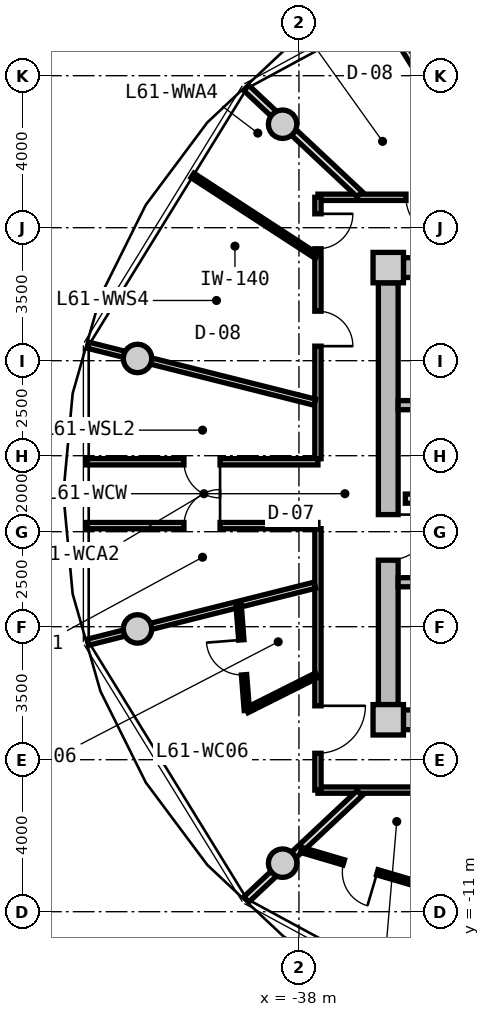
"""IFC4 building model, lengths in metres.
Left out: names, types, materials, properties, quantities, classifications, styles, units other than length and angle.
Written with IfcOpenShell. Run it as: python <this file> out.ifc"""

import sys

from ifc_helpers import new_model, si_unit, direction, frame, frame_2d, origin, origin_2d, place, context, subcontext, project, spatial, rectangle, circle, extrude, source, transform, mapped, element, fill, save


model = new_model("IFC4")
c1 = context("Model", 3, precision=1e-05, world=origin(), true_north=direction((0.0, 1.0)))
c2 = subcontext(c1, "Body", "Model", "MODEL_VIEW")
j1 = project(units=[si_unit("LENGTHUNIT", "METRE"), si_unit("PLANEANGLEUNIT", "RADIAN")], contexts=[c1])
p1 = place(None, origin())
s1 = spatial("IfcSite", under=j1, at=p1, CompositionType="ELEMENT")
p2 = place(p1, origin())
s2 = spatial("IfcBuilding", under=s1, at=p2, CompositionType="ELEMENT")
p3 = place(p2, frame((0.0, 0.0, 196.75)))
s3 = spatial("IfcBuildingStorey", under=s2, at=p3, CompositionType="ELEMENT", Elevation=196.75)
m1 = source(origin(), c2, "Body", "SweptSolid", [
    extrude(rectangle(XDim=0.8, YDim=0.8, at=origin_2d()), origin(), (0.0, 0.0, 1.0), 3.05),
])
for number, where, z_axis, x_axis in (
    (1, (-35.65, -5.95, 0.0), (0.0, 0.0, 1.0), (1.0, 0.0, 0.0)),
    (2, (-35.65, 5.95, 0.0), (0.0, 0.0, 1.0), (1.0, 0.0, 0.0)),
):
    element("IfcColumn", number, at=place(p3, frame(where, z_axis=z_axis, x_axis=x_axis)), inside=s3, PredefinedType="COLUMN", context=c2, shape_type="MappedRepresentation", body=[
        mapped(m1, transform((0.0, 0.0, 0.0), x_axis=(1.0, 0.0, 0.0), y_axis=(0.0, 1.0, 0.0), z_axis=(0.0, 0.0, 1.0), scale=1.0)),
    ])
m2 = source(origin(), c2, "Body", "SweptSolid", [
    extrude(rectangle(XDim=14.5, YDim=0.52, at=frame_2d((7.25, 0.0))), origin(), (0.0, 0.0, 1.0), 2.76),
])
for number, where, z_axis, x_axis in (
    (3, (-35.25, 5.95, 0.0), (0.0, 0.0, 1.0), (1.0, 0.0, 0.0)),
    (4, (-20.75, -5.95, 0.0), (0.0, 0.0, 1.0), (-1.0, 0.0, 0.0)),
):
    element("IfcWall", number, at=place(p3, frame(where, z_axis=z_axis, x_axis=x_axis)), inside=s3, PredefinedType="SHEAR", context=c2, shape_type="MappedRepresentation", body=[
        mapped(m2, transform((0.0, 0.0, 0.0), x_axis=(1.0, 0.0, 0.0), y_axis=(0.0, 1.0, 0.0), z_axis=(0.0, 0.0, 1.0), scale=1.0)),
    ])
m3 = source(origin(), c2, "Body", "SweptSolid", [
    extrude(rectangle(XDim=11.1, YDim=0.52, at=frame_2d((5.55, 0.0))), origin(), (0.0, 0.0, 1.0), 2.76),
])
p4 = place(p3, frame((-35.65, -5.55, 0.0), z_axis=(0.0, 0.0, 1.0), x_axis=(0.0, 1.0, 0.0)))
e5 = element("IfcWall", 5, at=p4, inside=s3, PredefinedType="SHEAR", context=c2, shape_type="MappedRepresentation", body=[
    mapped(m3, transform((0.0, 0.0, 0.0), x_axis=(1.0, 0.0, 0.0), y_axis=(0.0, 1.0, 0.0), z_axis=(0.0, 0.0, 1.0), scale=1.0)),
])
p5 = place(p4, frame((3.8, 0.0, 0.0)))
e6 = element("IfcOpeningElement", 6, at=p5, cuts=e5, PredefinedType="OPENING", context=c2, shape_type="SweptSolid", body=[
    extrude(rectangle(XDim=1.2, YDim=2.15, at=frame_2d((0.6, 1.075))), frame((0.0, 0.27, 0.0), z_axis=(0.0, -1.0, 0.0), x_axis=(1.0, 0.0, 0.0)), (0.0, 0.0, 1.0), 0.54),
])
m4 = source(origin(), c2, "Body", "SweptSolid", [
    extrude(circle(Radius=0.375, at=origin_2d()), origin(), (0.0, 0.0, 1.0), 3.05),
])
for number, where, z_axis, x_axis in (
    (7, (-38.43, 9.723, 0.0), (0.0, 0.0, 1.0), (1.0, 0.0, 0.0)),
    (8, (-42.247, 3.559, 0.0), (0.0, 0.0, 1.0), (1.0, 0.0, 0.0)),
    (9, (-42.247, -3.559, 0.0), (0.0, 0.0, 1.0), (1.0, 0.0, 0.0)),
    (10, (-38.43, -9.723, 0.0), (0.0, 0.0, 1.0), (1.0, 0.0, 0.0)),
):
    element("IfcColumn", number, at=place(p3, frame(where, z_axis=z_axis, x_axis=x_axis)), inside=s3, PredefinedType="COLUMN", context=c2, shape_type="MappedRepresentation", body=[
        mapped(m4, transform((0.0, 0.0, 0.0), x_axis=(1.0, 0.0, 0.0), y_axis=(0.0, 1.0, 0.0), z_axis=(0.0, 0.0, 1.0), scale=1.0)),
    ])
m5 = source(origin(), c2, "Body", "SweptSolid", [
    extrude(rectangle(XDim=7.93, YDim=0.24, at=frame_2d((3.965, 0.0))), origin(), (0.0, 0.0, 1.0), 2.76),
])
p6 = place(p3, frame((-35.39, 2.33, 0.0), z_axis=(0.0, 0.0, 1.0), x_axis=(1.0, 0.0, 0.0)))
e11 = element("IfcWall", 11, at=p6, inside=s3, PredefinedType="PARTITIONING", context=c2, shape_type="MappedRepresentation", body=[
    mapped(m5, transform((0.0, 0.0, 0.0), x_axis=(1.0, 0.0, 0.0), y_axis=(0.0, 1.0, 0.0), z_axis=(0.0, 0.0, 1.0), scale=1.0)),
])
p7 = place(p3, frame((-35.39, -2.33, 0.0), z_axis=(0.0, 0.0, 1.0), x_axis=(1.0, 0.0, 0.0)))
e12 = element("IfcWall", 12, at=p7, inside=s3, PredefinedType="PARTITIONING", context=c2, shape_type="MappedRepresentation", body=[
    mapped(m5, transform((0.0, 0.0, 0.0), x_axis=(1.0, 0.0, 0.0), y_axis=(0.0, 1.0, 0.0), z_axis=(0.0, 0.0, 1.0), scale=1.0)),
])
p8 = place(p7, frame((1.05, 0.0, 0.0)))
e13 = element("IfcOpeningElement", 13, at=p8, cuts=e12, PredefinedType="OPENING", context=c2, shape_type="SweptSolid", body=[
    extrude(rectangle(XDim=1.1, YDim=2.15, at=frame_2d((0.55, 1.075))), frame((0.0, 0.13, 0.0), z_axis=(0.0, -1.0, 0.0), x_axis=(1.0, 0.0, 0.0)), (0.0, 0.0, 1.0), 0.26),
])
m6 = source(origin(), c2, "Body", "SweptSolid", [
    extrude(rectangle(XDim=7.62, YDim=0.24, at=frame_2d((3.81, 0.0))), origin(), (0.0, 0.0, 1.0), 2.745),
])
p9 = place(p3, frame((-35.2, -0.13, 0.0), z_axis=(0.0, 0.0, 1.0), x_axis=(1.0, 0.0, 0.0)))
e14 = element("IfcWall", 14, at=p9, inside=s3, PredefinedType="PARTITIONING", context=c2, shape_type="MappedRepresentation", body=[
    mapped(m6, transform((0.0, 0.0, 0.0), x_axis=(1.0, 0.0, 0.0), y_axis=(0.0, 1.0, 0.0), z_axis=(0.0, 0.0, 1.0), scale=1.0)),
])
p10 = place(p9, frame((6.22, 0.0, 0.0)))
e15 = element("IfcOpeningElement", 15, at=p10, cuts=e14, PredefinedType="OPENING", context=c2, shape_type="SweptSolid", body=[
    extrude(rectangle(XDim=1.0, YDim=2.1, at=frame_2d((0.5, 1.05))), frame((0.0, 0.13, 0.0), z_axis=(0.0, -1.0, 0.0), x_axis=(1.0, 0.0, 0.0)), (0.0, 0.0, 1.0), 0.26),
])
p11 = place(p9, frame((2.4, 0.0, 0.0)))
e16 = element("IfcOpeningElement", 16, at=p11, cuts=e14, PredefinedType="OPENING", context=c2, shape_type="SweptSolid", body=[
    extrude(rectangle(XDim=1.0, YDim=2.1, at=frame_2d((0.5, 1.05))), frame((0.0, 0.13, 0.0), z_axis=(0.0, -1.0, 0.0), x_axis=(1.0, 0.0, 0.0)), (0.0, 0.0, 1.0), 0.26),
])
m7 = source(origin(), c2, "Body", "SweptSolid", [
    extrude(rectangle(XDim=8.58, YDim=0.165, at=frame_2d((4.29, 0.0))), origin(), (0.0, 0.0, 1.0), 2.745),
])
p12 = place(p3, frame((-37.5, 7.8, 0.0), z_axis=(0.0, 0.0, 1.0), x_axis=(1.0, 0.0, 0.0)))
e17 = element("IfcWall", 17, at=p12, inside=s3, PredefinedType="PARTITIONING", context=c2, shape_type="MappedRepresentation", body=[
    mapped(m7, transform((0.0, 0.0, 0.0), x_axis=(1.0, 0.0, 0.0), y_axis=(0.0, 1.0, 0.0), z_axis=(0.0, 0.0, 1.0), scale=1.0)),
])
p13 = place(p12, frame((5.408, 0.0, 0.0)))
e18 = element("IfcOpeningElement", 18, at=p13, cuts=e17, PredefinedType="OPENING", context=c2, shape_type="SweptSolid", body=[
    extrude(rectangle(XDim=1.05, YDim=2.15, at=frame_2d((0.525, 1.075))), frame((0.0, 0.093, 0.0), z_axis=(0.0, -1.0, 0.0), x_axis=(1.0, 0.0, 0.0)), (0.0, 0.0, 1.0), 0.185),
])
p14 = place(p12, frame((2.317, 0.0, 0.0)))
e19 = element("IfcOpeningElement", 19, at=p14, cuts=e17, PredefinedType="OPENING", context=c2, shape_type="SweptSolid", body=[
    extrude(rectangle(XDim=1.05, YDim=2.15, at=frame_2d((0.525, 1.075))), frame((0.0, 0.093, 0.0), z_axis=(0.0, -1.0, 0.0), x_axis=(1.0, 0.0, 0.0)), (0.0, 0.0, 1.0), 0.185),
])
m8 = source(origin(), c2, "Body", "SweptSolid", [
    extrude(rectangle(XDim=19.0, YDim=0.165, at=frame_2d((9.5, 0.0))), origin(), (0.0, 0.0, 1.0), 2.745),
])
p15 = place(p3, frame((-18.5, -7.8, 0.0), z_axis=(0.0, 0.0, 1.0), x_axis=(-1.0, 0.0, 0.0)))
e20 = element("IfcWall", 20, at=p15, inside=s3, PredefinedType="PARTITIONING", context=c2, shape_type="MappedRepresentation", body=[
    mapped(m8, transform((0.0, 0.0, 0.0), x_axis=(1.0, 0.0, 0.0), y_axis=(0.0, 1.0, 0.0), z_axis=(0.0, 0.0, 1.0), scale=1.0)),
])
p16 = place(p15, frame((12.569, 0.0, 0.0)))
e21 = element("IfcOpeningElement", 21, at=p16, cuts=e20, PredefinedType="OPENING", context=c2, shape_type="SweptSolid", body=[
    extrude(rectangle(XDim=1.25, YDim=2.2, at=frame_2d((0.625, 1.1))), frame((0.0, 0.093, 0.0), z_axis=(0.0, -1.0, 0.0), x_axis=(1.0, 0.0, 0.0)), (0.0, 0.0, 1.0), 0.185),
])
p17 = place(p15, frame((7.868, 0.0, 0.0)))
e22 = element("IfcOpeningElement", 22, at=p17, cuts=e20, PredefinedType="OPENING", context=c2, shape_type="SweptSolid", body=[
    extrude(rectangle(XDim=1.25, YDim=2.2, at=frame_2d((0.625, 1.1))), frame((0.0, 0.093, 0.0), z_axis=(0.0, -1.0, 0.0), x_axis=(1.0, 0.0, 0.0)), (0.0, 0.0, 1.0), 0.185),
])
p18 = place(p15, frame((3.559, 0.0, 0.0)))
e23 = element("IfcOpeningElement", 23, at=p18, cuts=e20, PredefinedType="OPENING", context=c2, shape_type="SweptSolid", body=[
    extrude(rectangle(XDim=1.25, YDim=2.2, at=frame_2d((0.625, 1.1))), frame((0.0, 0.093, 0.0), z_axis=(0.0, -1.0, 0.0), x_axis=(1.0, 0.0, 0.0)), (0.0, 0.0, 1.0), 0.185),
])
m9 = source(origin(), c2, "Body", "SweptSolid", [
    extrude(rectangle(XDim=6.88, YDim=0.165, at=frame_2d((3.44, 0.0))), origin(), (0.0, 0.0, 1.0), 2.745),
])
p19 = place(p3, frame((-37.5, -7.8, 0.0), z_axis=(0.0, 0.0, 1.0), x_axis=(0.0, 1.0, 0.0)))
e24 = element("IfcWall", 24, at=p19, inside=s3, PredefinedType="PARTITIONING", context=c2, shape_type="MappedRepresentation", body=[
    mapped(m9, transform((0.0, 0.0, 0.0), x_axis=(1.0, 0.0, 0.0), y_axis=(0.0, 1.0, 0.0), z_axis=(0.0, 0.0, 1.0), scale=1.0)),
])
p20 = place(p19, frame((0.968, 0.0, 0.0)))
e25 = element("IfcOpeningElement", 25, at=p20, cuts=e24, PredefinedType="OPENING", context=c2, shape_type="SweptSolid", body=[
    extrude(rectangle(XDim=1.25, YDim=2.2, at=frame_2d((0.625, 1.1))), frame((0.0, 0.093, 0.0), z_axis=(0.0, -1.0, 0.0), x_axis=(1.0, 0.0, 0.0)), (0.0, 0.0, 1.0), 0.185),
])
p21 = place(p3, frame((-37.5, 0.92, 0.0), z_axis=(0.0, 0.0, 1.0), x_axis=(0.0, 1.0, 0.0)))
e26 = element("IfcWall", 26, at=p21, inside=s3, PredefinedType="PARTITIONING", context=c2, shape_type="MappedRepresentation", body=[
    mapped(m9, transform((0.0, 0.0, 0.0), x_axis=(1.0, 0.0, 0.0), y_axis=(0.0, 1.0, 0.0), z_axis=(0.0, 0.0, 1.0), scale=1.0)),
])
p22 = place(p21, frame((5.525, 0.0, 0.0)))
e27 = element("IfcOpeningElement", 27, at=p22, cuts=e26, PredefinedType="OPENING", context=c2, shape_type="SweptSolid", body=[
    extrude(rectangle(XDim=0.92, YDim=2.1, at=frame_2d((0.46, 1.05))), frame((0.0, 0.093, 0.0), z_axis=(0.0, -1.0, 0.0), x_axis=(1.0, 0.0, 0.0)), (0.0, 0.0, 1.0), 0.185),
])
p23 = place(p21, frame((2.962, 0.0, 0.0)))
e28 = element("IfcOpeningElement", 28, at=p23, cuts=e26, PredefinedType="OPENING", context=c2, shape_type="SweptSolid", body=[
    extrude(rectangle(XDim=0.92, YDim=2.1, at=frame_2d((0.46, 1.05))), frame((0.0, 0.093, 0.0), z_axis=(0.0, -1.0, 0.0), x_axis=(1.0, 0.0, 0.0)), (0.0, 0.0, 1.0), 0.185),
])
m10 = source(origin(), c2, "Body", "SweptSolid", [
    extrude(rectangle(XDim=6.157, YDim=0.165, at=frame_2d((3.079, 0.0))), origin(), (0.0, 0.0, 1.0), 2.345),
])
for number, where, z_axis, x_axis in (
    (29, (-37.58, 2.407, 0.0), (0.0, 0.0, 1.0), (-0.97, 0.244, 0.0)),
    (30, (-37.58, -2.407, 0.0), (0.0, 0.0, 1.0), (-0.97, -0.244, 0.0)),
):
    element("IfcWall", number, at=place(p3, frame(where, z_axis=z_axis, x_axis=x_axis)), inside=s3, PredefinedType="PARTITIONING", context=c2, shape_type="MappedRepresentation", body=[
        mapped(m10, transform((0.0, 0.0, 0.0), x_axis=(1.0, 0.0, 0.0), y_axis=(0.0, 1.0, 0.0), z_axis=(0.0, 0.0, 1.0), scale=1.0)),
    ])
m11 = source(origin(), c2, "Body", "SweptSolid", [
    extrude(rectangle(XDim=6.101, YDim=0.165, at=frame_2d((3.051, 0.0))), origin(), (0.0, 0.0, 1.0), 2.745),
])
p24 = place(p3, frame((-43.601, 0.84, 0.0), z_axis=(0.0, 0.0, 1.0), x_axis=(1.0, 0.0, 0.0)))
e31 = element("IfcWall", 31, at=p24, inside=s3, PredefinedType="PARTITIONING", context=c2, shape_type="MappedRepresentation", body=[
    mapped(m11, transform((0.0, 0.0, 0.0), x_axis=(1.0, 0.0, 0.0), y_axis=(0.0, 1.0, 0.0), z_axis=(0.0, 0.0, 1.0), scale=1.0)),
])
p25 = place(p24, frame((2.576, 0.0, 0.0)))
e32 = element("IfcOpeningElement", 32, at=p25, cuts=e31, PredefinedType="OPENING", context=c2, shape_type="SweptSolid", body=[
    extrude(rectangle(XDim=0.95, YDim=2.1, at=frame_2d((0.475, 1.05))), frame((0.0, 0.093, 0.0), z_axis=(0.0, -1.0, 0.0), x_axis=(1.0, 0.0, 0.0)), (0.0, 0.0, 1.0), 0.185),
])
p26 = place(p3, frame((-37.5, -0.84, 0.0), z_axis=(0.0, 0.0, 1.0), x_axis=(-1.0, 0.0, 0.0)))
e33 = element("IfcWall", 33, at=p26, inside=s3, PredefinedType="PARTITIONING", context=c2, shape_type="MappedRepresentation", body=[
    mapped(m11, transform((0.0, 0.0, 0.0), x_axis=(1.0, 0.0, 0.0), y_axis=(0.0, 1.0, 0.0), z_axis=(0.0, 0.0, 1.0), scale=1.0)),
])
p27 = place(p26, frame((2.576, 0.0, 0.0)))
e34 = element("IfcOpeningElement", 34, at=p27, cuts=e33, PredefinedType="OPENING", context=c2, shape_type="SweptSolid", body=[
    extrude(rectangle(XDim=0.95, YDim=2.1, at=frame_2d((0.475, 1.05))), frame((0.0, 0.093, 0.0), z_axis=(0.0, -1.0, 0.0), x_axis=(1.0, 0.0, 0.0)), (0.0, 0.0, 1.0), 0.185),
])
m12 = source(origin(), c2, "Body", "SweptSolid", [
    extrude(rectangle(XDim=4.089, YDim=0.19, at=frame_2d((2.044, 0.0))), origin(), (0.0, 0.0, 1.0), 2.345),
])
p28 = place(p3, frame((-36.402, 7.88, 0.0), z_axis=(0.0, 0.0, 1.0), x_axis=(-0.729401273609, 0.684086092577, 0.0)))
e35 = element("IfcWall", 35, at=p28, inside=s3, PredefinedType="PARTITIONING", context=c2, shape_type="MappedRepresentation", body=[
    mapped(m12, transform((0.0, 0.0, 0.0), x_axis=(1.0, 0.0, 0.0), y_axis=(0.0, 1.0, 0.0), z_axis=(0.0, 0.0, 1.0), scale=1.0)),
])
m13 = source(origin(), c2, "Body", "SweptSolid", [
    extrude(rectangle(XDim=5.652, YDim=0.19, at=frame_2d((2.826, 0.0))), origin(), (0.0, 0.0, 1.0), 2.745),
])
p29 = place(p3, frame((-32.794, 7.83, 0.0), z_axis=(0.0, 0.0, 1.0), x_axis=(-0.527566076956, 0.84951399897, 0.0)))
e36 = element("IfcWall", 36, at=p29, inside=s3, PredefinedType="PARTITIONING", context=c2, shape_type="MappedRepresentation", body=[
    mapped(m13, transform((0.0, 0.0, 0.0), x_axis=(1.0, 0.0, 0.0), y_axis=(0.0, 1.0, 0.0), z_axis=(0.0, 0.0, 1.0), scale=1.0)),
])
m14 = source(origin(), c2, "Body", "SweptSolid", [
    extrude(rectangle(XDim=3.904, YDim=0.14, at=frame_2d((1.952, 0.0))), origin(), (0.0, 0.0, 1.0), 2.745),
])
p30 = place(p3, frame((-37.53, 6.246, 0.0), z_axis=(0.0, 0.0, 1.0), x_axis=(-0.838024687996, 0.545632314209, 0.0)))
e37 = element("IfcWall", 37, at=p30, inside=s3, PredefinedType="PARTITIONING", context=c2, shape_type="MappedRepresentation", body=[
    mapped(m14, transform((0.0, 0.0, 0.0), x_axis=(1.0, 0.0, 0.0), y_axis=(0.0, 1.0, 0.0), z_axis=(0.0, 0.0, 1.0), scale=1.0)),
])
p31 = place(p3, frame((-36.402, -7.88, 0.0), z_axis=(0.0, 0.0, 1.0), x_axis=(-0.729401273609, -0.684086092577, 0.0)))
e38 = element("IfcWall", 38, at=p31, inside=s3, PredefinedType="PARTITIONING", context=c2, shape_type="MappedRepresentation", body=[
    mapped(m12, transform((0.0, 0.0, 0.0), x_axis=(1.0, 0.0, 0.0), y_axis=(0.0, 1.0, 0.0), z_axis=(0.0, 0.0, 1.0), scale=1.0)),
])
m15 = source(origin(), c2, "Body", "SweptSolid", [
    extrude(rectangle(XDim=2.06, YDim=0.14, at=frame_2d((1.03, 0.0))), origin(), (0.0, 0.0, 1.0), 2.745),
])
p32 = place(p3, frame((-37.53, -4.778, 0.0), z_axis=(0.0, 0.0, 1.0), x_axis=(-0.893952568722, -0.448161583444, 0.0)))
e39 = element("IfcWall", 39, at=p32, inside=s3, PredefinedType="PARTITIONING", context=c2, shape_type="MappedRepresentation", body=[
    mapped(m15, transform((0.0, 0.0, 0.0), x_axis=(1.0, 0.0, 0.0), y_axis=(0.0, 1.0, 0.0), z_axis=(0.0, 0.0, 1.0), scale=1.0)),
])
m16 = source(origin(), c2, "Body", "SweptSolid", [
    extrude(rectangle(XDim=2.798, YDim=0.14, at=frame_2d((1.399, 0.0))), origin(), (0.0, 0.0, 1.0), 2.745),
])
p33 = place(p3, frame((-39.371, -5.701, 0.0), z_axis=(0.0, 0.0, 1.0), x_axis=(-0.077823984089, 0.996967114553, 0.0)))
e40 = element("IfcWall", 40, at=p33, inside=s3, PredefinedType="PARTITIONING", context=c2, shape_type="MappedRepresentation", body=[
    mapped(m16, transform((0.0, 0.0, 0.0), x_axis=(1.0, 0.0, 0.0), y_axis=(0.0, 1.0, 0.0), z_axis=(0.0, 0.0, 1.0), scale=1.0)),
])
p34 = place(p33, frame((0.939, 0.0, 0.0)))
e41 = element("IfcOpeningElement", 41, at=p34, cuts=e40, PredefinedType="OPENING", context=c2, shape_type="SweptSolid", body=[
    extrude(rectangle(XDim=0.92, YDim=2.1, at=frame_2d((0.46, 1.05))), frame((0.0, 0.08, 0.0), z_axis=(0.0, -1.0, 0.0), x_axis=(1.0, 0.0, 0.0)), (0.0, 0.0, 1.0), 0.16),
])
m17 = source(origin(), c2, "Body", "SweptSolid", [
    extrude(rectangle(XDim=3.252, YDim=0.14, at=frame_2d((1.626, 0.0))), origin(), (0.0, 0.0, 1.0), 2.745),
])
p35 = place(p3, frame((-34.82, -10.291, 0.0), z_axis=(0.0, 0.0, 1.0), x_axis=(-0.959294945864, 0.282406102695, 0.0)))
e42 = element("IfcWall", 42, at=p35, inside=s3, PredefinedType="PARTITIONING", context=c2, shape_type="MappedRepresentation", body=[
    mapped(m17, transform((0.0, 0.0, 0.0), x_axis=(1.0, 0.0, 0.0), y_axis=(0.0, 1.0, 0.0), z_axis=(0.0, 0.0, 1.0), scale=1.0)),
])
p36 = place(p35, frame((1.166, 0.0, 0.0)))
e43 = element("IfcOpeningElement", 43, at=p36, cuts=e42, PredefinedType="OPENING", context=c2, shape_type="SweptSolid", body=[
    extrude(rectangle(XDim=0.92, YDim=2.1, at=frame_2d((0.46, 1.05))), frame((0.0, 0.08, 0.0), z_axis=(0.0, -1.0, 0.0), x_axis=(1.0, 0.0, 0.0)), (0.0, 0.0, 1.0), 0.16),
])
m18 = source(origin(), c2, "Body", "SweptSolid", [
    extrude(rectangle(XDim=1.2, YDim=2.15, at=frame_2d((0.6, 1.075))), frame((0.0, 0.025, 0.0), z_axis=(0.0, -1.0, 0.0), x_axis=(1.0, 0.0, 0.0)), (0.0, 0.0, 1.0), 0.05),
])
p37 = place(p5, frame((1.2, 0.0, 0.0), z_axis=(0.0, 0.0, 1.0), x_axis=(-1.0, 0.0, 0.0)))
e44 = element("IfcDoor", 44, at=p37, inside=s3, OperationType="SINGLE_SWING_LEFT", PredefinedType="DOOR", context=c2, shape_type="MappedRepresentation", body=[
    mapped(m18, transform((0.0, 0.0, 0.0), x_axis=(1.0, 0.0, 0.0), y_axis=(0.0, 1.0, 0.0), z_axis=(0.0, 0.0, 1.0), scale=1.0)),
])
fill(e6, e44)
m19 = source(origin(), c2, "Body", "SweptSolid", [
    extrude(rectangle(XDim=0.95, YDim=2.1, at=frame_2d((0.475, 1.05))), frame((0.0, 0.025, 0.0), z_axis=(0.0, -1.0, 0.0), x_axis=(1.0, 0.0, 0.0)), (0.0, 0.0, 1.0), 0.05),
])
p38 = place(p27, frame((0.95, 0.0, 0.0), z_axis=(0.0, 0.0, 1.0), x_axis=(-1.0, 0.0, 0.0)))
e45 = element("IfcDoor", 45, at=p38, inside=s3, OperationType="SINGLE_SWING_RIGHT", PredefinedType="DOOR", context=c2, shape_type="MappedRepresentation", body=[
    mapped(m19, transform((0.0, 0.0, 0.0), x_axis=(1.0, 0.0, 0.0), y_axis=(0.0, 1.0, 0.0), z_axis=(0.0, 0.0, 1.0), scale=1.0)),
])
fill(e34, e45)
p39 = place(p25, frame((0.95, 0.0, 0.0), z_axis=(0.0, 0.0, 1.0), x_axis=(-1.0, 0.0, 0.0)))
e46 = element("IfcDoor", 46, at=p39, inside=s3, OperationType="SINGLE_SWING_LEFT", PredefinedType="DOOR", context=c2, shape_type="MappedRepresentation", body=[
    mapped(m19, transform((0.0, 0.0, 0.0), x_axis=(1.0, 0.0, 0.0), y_axis=(0.0, 1.0, 0.0), z_axis=(0.0, 0.0, 1.0), scale=1.0)),
])
fill(e32, e46)
m20 = source(origin(), c2, "Body", "SweptSolid", [
    extrude(rectangle(XDim=1.05, YDim=2.15, at=frame_2d((0.525, 1.075))), frame((0.0, 0.025, 0.0), z_axis=(0.0, -1.0, 0.0), x_axis=(1.0, 0.0, 0.0)), (0.0, 0.0, 1.0), 0.05),
])
p40 = place(p14, frame((1.05, 0.0, 0.0), z_axis=(0.0, 0.0, 1.0), x_axis=(-1.0, 0.0, 0.0)))
e47 = element("IfcDoor", 47, at=p40, inside=s3, OperationType="SINGLE_SWING_LEFT", PredefinedType="DOOR", context=c2, shape_type="MappedRepresentation", body=[
    mapped(m20, transform((0.0, 0.0, 0.0), x_axis=(1.0, 0.0, 0.0), y_axis=(0.0, 1.0, 0.0), z_axis=(0.0, 0.0, 1.0), scale=1.0)),
])
fill(e19, e47)
m21 = source(origin(), c2, "Body", "SweptSolid", [
    extrude(rectangle(XDim=0.92, YDim=2.1, at=frame_2d((0.46, 1.05))), frame((0.0, 0.025, 0.0), z_axis=(0.0, -1.0, 0.0), x_axis=(1.0, 0.0, 0.0)), (0.0, 0.0, 1.0), 0.05),
])
p41 = place(p22, frame((0.92, 0.0, 0.0), z_axis=(0.0, 0.0, 1.0), x_axis=(-1.0, 0.0, 0.0)))
e48 = element("IfcDoor", 48, at=p41, inside=s3, OperationType="SINGLE_SWING_LEFT", PredefinedType="DOOR", context=c2, shape_type="MappedRepresentation", body=[
    mapped(m21, transform((0.0, 0.0, 0.0), x_axis=(1.0, 0.0, 0.0), y_axis=(0.0, 1.0, 0.0), z_axis=(0.0, 0.0, 1.0), scale=1.0)),
])
fill(e27, e48)
p42 = place(p23, frame((0.92, 0.0, 0.0), z_axis=(0.0, 0.0, 1.0), x_axis=(-1.0, 0.0, 0.0)))
e49 = element("IfcDoor", 49, at=p42, inside=s3, OperationType="SINGLE_SWING_RIGHT", PredefinedType="DOOR", context=c2, shape_type="MappedRepresentation", body=[
    mapped(m21, transform((0.0, 0.0, 0.0), x_axis=(1.0, 0.0, 0.0), y_axis=(0.0, 1.0, 0.0), z_axis=(0.0, 0.0, 1.0), scale=1.0)),
])
fill(e28, e49)
m22 = source(origin(), c2, "Body", "SweptSolid", [
    extrude(rectangle(XDim=1.25, YDim=2.2, at=frame_2d((0.625, 1.1))), frame((0.0, 0.025, 0.0), z_axis=(0.0, -1.0, 0.0), x_axis=(1.0, 0.0, 0.0)), (0.0, 0.0, 1.0), 0.05),
])
p43 = place(p20, frame((1.25, 0.0, 0.0), z_axis=(0.0, 0.0, 1.0), x_axis=(-1.0, 0.0, 0.0)))
e50 = element("IfcDoor", 50, at=p43, inside=s3, OperationType="SINGLE_SWING_LEFT", PredefinedType="DOOR", context=c2, shape_type="MappedRepresentation", body=[
    mapped(m22, transform((0.0, 0.0, 0.0), x_axis=(1.0, 0.0, 0.0), y_axis=(0.0, 1.0, 0.0), z_axis=(0.0, 0.0, 1.0), scale=1.0)),
])
fill(e25, e50)
p44 = place(p34, origin())
e51 = element("IfcDoor", 51, at=p44, inside=s3, OperationType="SINGLE_SWING_RIGHT", PredefinedType="DOOR", context=c2, shape_type="MappedRepresentation", body=[
    mapped(m21, transform((0.0, 0.0, 0.0), x_axis=(1.0, 0.0, 0.0), y_axis=(0.0, 1.0, 0.0), z_axis=(0.0, 0.0, 1.0), scale=1.0)),
])
fill(e41, e51)
p45 = place(p36, origin())
e52 = element("IfcDoor", 52, at=p45, inside=s3, OperationType="SINGLE_SWING_LEFT", PredefinedType="DOOR", context=c2, shape_type="MappedRepresentation", body=[
    mapped(m21, transform((0.0, 0.0, 0.0), x_axis=(1.0, 0.0, 0.0), y_axis=(0.0, 1.0, 0.0), z_axis=(0.0, 0.0, 1.0), scale=1.0)),
])
fill(e43, e52)
save(model, sys.argv[1])
